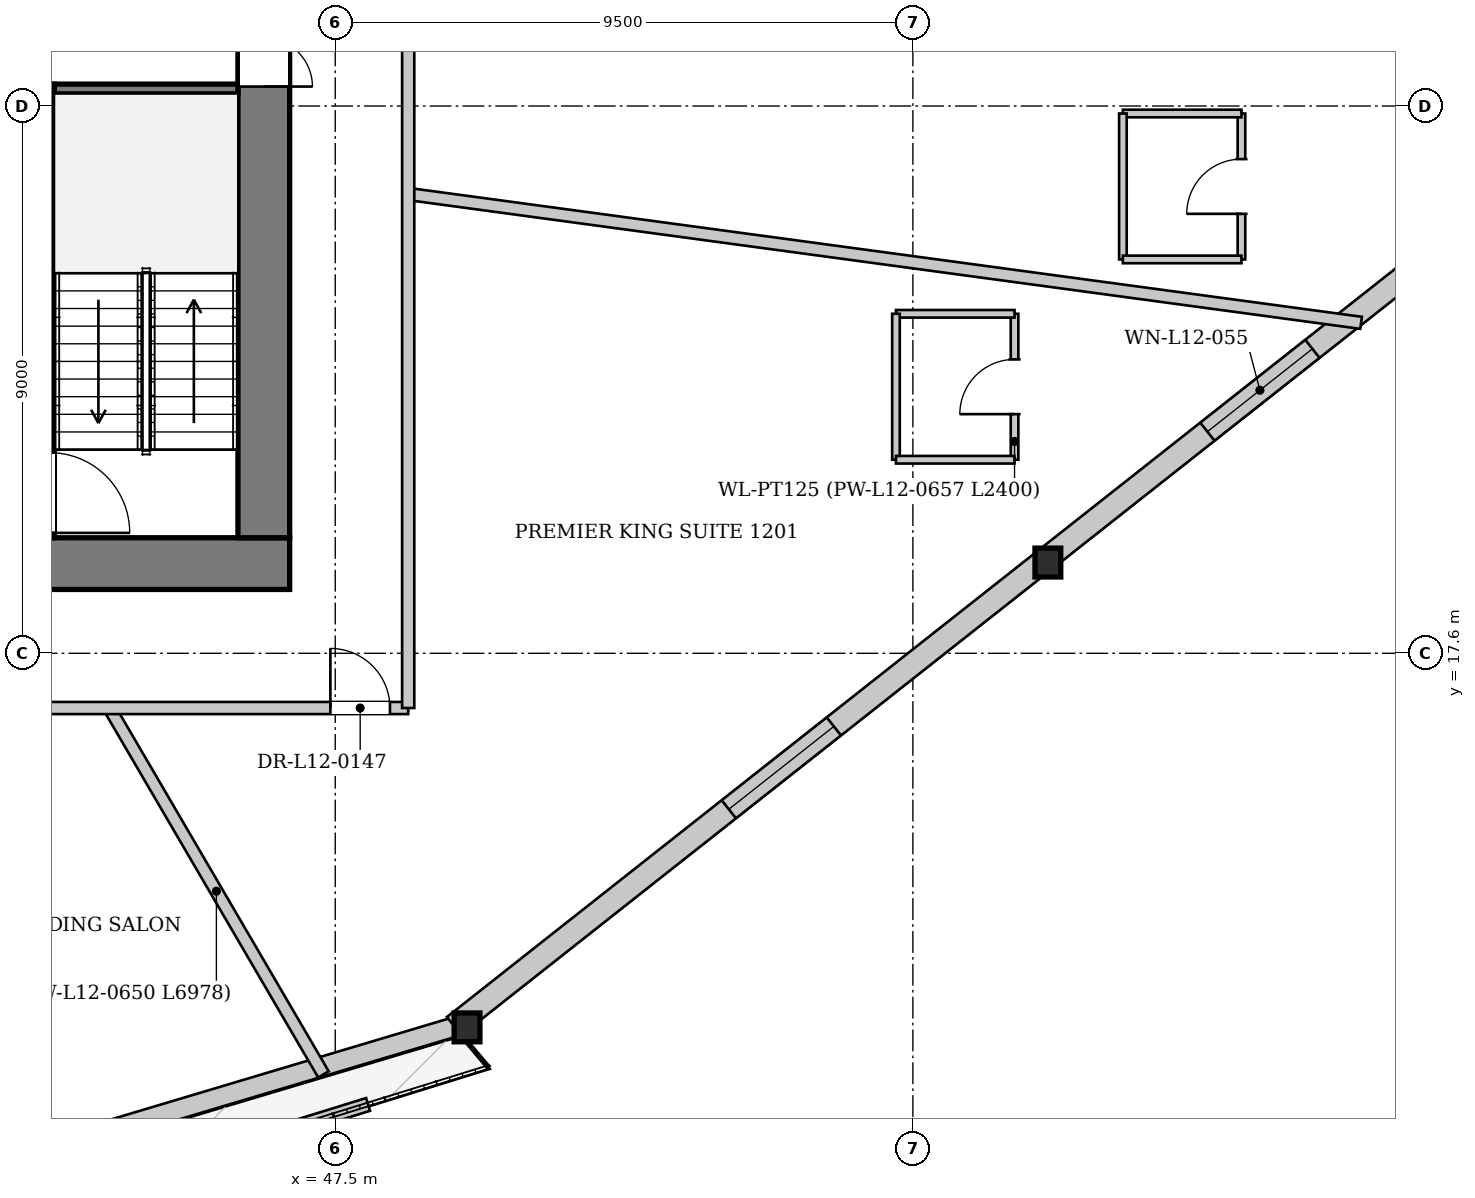
"""IFC4 building model, lengths in metres.
Left out: names, types, materials, properties, quantities, classifications, styles, units other than length and angle.
Written with IfcOpenShell. Run it as: python <this file> out.ifc"""

import sys

from ifc_helpers import new_model, si_unit, direction, frame, frame_2d, origin, origin_2d, place, context, subcontext, project, spatial, rectangle, i_section, extrude, source, transform, mapped, element, fill, save


model = new_model("IFC4")
c1 = context("Model", 3, precision=1e-05, world=origin(), true_north=direction((0.0, 1.0)))
c2 = subcontext(c1, "Body", "Model", "MODEL_VIEW")
j1 = project(units=[si_unit("LENGTHUNIT", "METRE"), si_unit("PLANEANGLEUNIT", "RADIAN")], contexts=[c1])
p1 = place(None, origin())
s1 = spatial("IfcSite", under=j1, at=p1, CompositionType="ELEMENT")
p2 = place(p1, origin())
s2 = spatial("IfcBuilding", under=s1, at=p2, CompositionType="ELEMENT")
p3 = place(p2, frame((0.0, 0.0, 50.6)))
s3 = spatial("IfcBuildingStorey", under=s2, at=p3, CompositionType="ELEMENT", Elevation=50.6)
m1 = source(origin(), c2, "Body", "SweptSolid", [
    extrude(i_section(OverallWidth=0.424, OverallDepth=0.474, WebThickness=0.043, FlangeThickness=0.068, at=origin_2d()), origin(), (0.0, 0.0, 1.0), 3.4),
])
p4 = place(p3, frame((49.572, 11.321, 0.0), z_axis=(0.056153057733, 0.074966486283, 0.995603766587), x_axis=(-0.800367834752, 0.599509240207, 0.0)))
e1 = element("IfcColumn", 1, at=p4, inside=s3, PredefinedType="COLUMN", context=c2, shape_type="MappedRepresentation", body=[
    mapped(m1, transform((0.0, 0.0, 0.0), x_axis=(1.0, 0.0, 0.0), y_axis=(0.0, 1.0, 0.0), z_axis=(0.0, 0.0, 1.0), scale=1.0)),
])
m2 = source(origin(), c2, "Body", "SweptSolid", [
    extrude(i_section(OverallWidth=0.424, OverallDepth=0.474, WebThickness=0.043, FlangeThickness=0.068, at=origin_2d()), origin(), (0.0, 0.0, 1.0), 3.407),
])
p5 = place(p3, frame((59.184, 18.904, 0.0), z_axis=(0.021141159141, 0.110650676994, 0.993634479611), x_axis=(-0.982232614572, 0.187667500841, 0.0)))
e2 = element("IfcColumn", 2, at=p5, inside=s3, PredefinedType="COLUMN", context=c2, shape_type="MappedRepresentation", body=[
    mapped(m2, transform((0.0, 0.0, 0.0), x_axis=(1.0, 0.0, 0.0), y_axis=(0.0, 1.0, 0.0), z_axis=(0.0, 0.0, 1.0), scale=1.0)),
])
p6 = place(p3, frame((49.526, 11.474, 0.0), z_axis=(0.0, 0.0, 1.0), x_axis=(-0.958183644485, -0.286153985541, 0.0)))
e3 = element("IfcWall", 3, at=p6, inside=s3, PredefinedType="SOLIDWALL", context=c2, shape_type="SweptSolid", body=[
    extrude(rectangle(XDim=24.487, YDim=0.32, at=frame_2d((12.244, 0.0))), origin(), (0.0, 0.0, 1.0), 2.592),
])
p7 = place(p6, frame((7.286, 0.0, 0.0)))
e4 = element("IfcOpeningElement", 4, at=p7, cuts=e3, PredefinedType="OPENING", context=c2, shape_type="SweptSolid", body=[
    extrude(rectangle(XDim=1.1, YDim=2.3, at=frame_2d((0.55, 1.15))), frame((0.0, 0.17, 0.0), z_axis=(0.0, -1.0, 0.0), x_axis=(1.0, 0.0, 0.0)), (0.0, 0.0, 1.0), 0.34),
])
p8 = place(p6, frame((17.221, 0.0, 0.272)))
e5 = element("IfcOpeningElement", 5, at=p8, cuts=e3, PredefinedType="OPENING", context=c2, shape_type="SweptSolid", body=[
    extrude(rectangle(XDim=1.8, YDim=2.2, at=frame_2d((0.9, 1.1))), frame((0.0, 0.17, 0.0), z_axis=(0.0, -1.0, 0.0), x_axis=(1.0, 0.0, 0.0)), (0.0, 0.0, 1.0), 0.34),
])
p9 = place(p3, frame((68.679, 26.637, 0.0), z_axis=(0.0, 0.0, 1.0), x_axis=(-0.785087909817, -0.619384350674, 0.0)))
e6 = element("IfcWall", 6, at=p9, inside=s3, PredefinedType="SOLIDWALL", context=c2, shape_type="SweptSolid", body=[
    extrude(rectangle(XDim=24.487, YDim=0.38, at=frame_2d((12.244, 0.0))), origin(), (0.0, 0.0, 1.0), 2.592),
])
p10 = place(p9, frame((6.506, 0.0, 0.222)))
e7 = element("IfcOpeningElement", 7, at=p10, cuts=e6, PredefinedType="OPENING", context=c2, shape_type="SweptSolid", body=[
    extrude(rectangle(XDim=2.2, YDim=2.25, at=frame_2d((1.1, 1.125))), frame((0.0, 0.2, 0.0), z_axis=(0.0, -1.0, 0.0), x_axis=(1.0, 0.0, 0.0)), (0.0, 0.0, 1.0), 0.4),
])
p11 = place(p9, frame((16.531, 0.0, 0.222)))
e8 = element("IfcOpeningElement", 8, at=p11, cuts=e6, PredefinedType="OPENING", context=c2, shape_type="SweptSolid", body=[
    extrude(rectangle(XDim=2.2, YDim=2.25, at=frame_2d((1.1, 1.125))), frame((0.0, 0.2, 0.0), z_axis=(0.0, -1.0, 0.0), x_axis=(1.0, 0.0, 0.0)), (0.0, 0.0, 1.0), 0.4),
])
p12 = place(p3, frame((27.287, 3.753, 0.0), z_axis=(0.0, 0.0, 1.0), x_axis=(0.95522578955, 0.295877831173, 0.0)))
e9 = element("IfcWall", 9, at=p12, inside=s3, PredefinedType="PARAPET", context=c2, shape_type="SweptSolid", body=[
    extrude(rectangle(XDim=21.726, YDim=0.22, at=frame_2d((10.863, 0.0))), origin(), (0.0, 0.0, 1.0), 0.3),
])
p13 = place(p3, frame((46.75, 19.075, 0.0), z_axis=(0.0, 0.0, 1.0), x_axis=(-1.0, 0.0, 0.0)))
e10 = element("IfcWall", 10, at=p13, inside=s3, PredefinedType="SHEAR", context=c2, shape_type="SweptSolid", body=[
    extrude(rectangle(XDim=17.5, YDim=0.85, at=frame_2d((8.75, 0.0))), origin(), (0.0, 0.0, 1.0), 3.3),
])
p14 = place(p13, frame((4.95, 0.0, 0.0)))
e11 = element("IfcOpeningElement", 11, at=p14, cuts=e10, PredefinedType="OPENING", context=c2, shape_type="SweptSolid", body=[
    extrude(rectangle(XDim=1.12, YDim=2.25, at=frame_2d((0.56, 1.125))), frame((0.0, 0.435, 0.0), z_axis=(0.0, -1.0, 0.0), x_axis=(1.0, 0.0, 0.0)), (0.0, 0.0, 1.0), 0.87),
])
p15 = place(p13, frame((11.45, 0.0, 0.0)))
e12 = element("IfcOpeningElement", 12, at=p15, cuts=e10, PredefinedType="OPENING", context=c2, shape_type="SweptSolid", body=[
    extrude(rectangle(XDim=1.12, YDim=2.25, at=frame_2d((0.56, 1.125))), frame((0.0, 0.435, 0.0), z_axis=(0.0, -1.0, 0.0), x_axis=(1.0, 0.0, 0.0)), (0.0, 0.0, 1.0), 0.87),
])
p16 = place(p3, frame((46.325, 33.7, 0.0), z_axis=(0.0, 0.0, 1.0), x_axis=(0.0, -1.0, 0.0)))
e13 = element("IfcWall", 13, at=p16, inside=s3, PredefinedType="SHEAR", context=c2, shape_type="SweptSolid", body=[
    extrude(rectangle(XDim=14.2, YDim=0.85, at=frame_2d((7.1, 0.0))), origin(), (0.0, 0.0, 1.0), 3.3),
])
p17 = place(p16, frame((5.18, 0.0, 0.0)))
e14 = element("IfcOpeningElement", 14, at=p17, cuts=e13, PredefinedType="OPENING", context=c2, shape_type="SweptSolid", body=[
    extrude(rectangle(XDim=1.6, YDim=2.2, at=frame_2d((0.8, 1.1))), frame((0.0, 0.435, 0.0), z_axis=(0.0, -1.0, 0.0), x_axis=(1.0, 0.0, 0.0)), (0.0, 0.0, 1.0), 0.87),
])
p18 = place(p3, frame((42.8, 26.96, 0.0), z_axis=(0.0, 0.0, 1.0), x_axis=(0.0, -1.0, 0.0)))
e15 = element("IfcWall", 15, at=p18, inside=s3, PredefinedType="PARTITIONING", context=c2, shape_type="SweptSolid", body=[
    extrude(rectangle(XDim=7.46, YDim=0.16, at=frame_2d((3.73, 0.0))), origin(), (0.0, 0.0, 1.0), 3.3),
])
p19 = place(p18, frame((6.06, 0.0, 0.0)))
e16 = element("IfcOpeningElement", 16, at=p19, cuts=e15, PredefinedType="OPENING", context=c2, shape_type="SweptSolid", body=[
    extrude(rectangle(XDim=1.32, YDim=2.2, at=frame_2d((0.66, 1.1))), frame((0.0, 0.09, 0.0), z_axis=(0.0, -1.0, 0.0), x_axis=(1.0, 0.0, 0.0)), (0.0, 0.0, 1.0), 0.18),
])
p20 = place(p3, frame((42.88, 26.88, 0.0), z_axis=(0.0, 0.0, 1.0), x_axis=(1.0, 0.0, 0.0)))
e17 = element("IfcWall", 17, at=p20, inside=s3, PredefinedType="PARTITIONING", context=c2, shape_type="SweptSolid", body=[
    extrude(rectangle(XDim=3.02, YDim=0.16, at=frame_2d((1.51, 0.0))), origin(), (0.0, 0.0, 1.0), 3.3),
])
p21 = place(p3, frame((43.785, 16.7, 0.0), z_axis=(0.0, 0.0, 1.0), x_axis=(0.504536520789, -0.863390351573, 0.0)))
e18 = element("IfcWall", 18, at=p21, inside=s3, PredefinedType="PARTITIONING", context=c2, shape_type="SweptSolid", body=[
    extrude(rectangle(XDim=6.978, YDim=0.2, at=frame_2d((3.489, 0.0))), origin(), (0.0, 0.0, 1.0), 3.3),
])
p22 = place(p3, frame((48.7, 25.153, 0.0), z_axis=(0.0, 0.0, 1.0), x_axis=(0.990982571001, -0.133990835404, 0.0)))
e19 = element("IfcWall", 19, at=p22, inside=s3, PredefinedType="PARTITIONING", context=c2, shape_type="SweptSolid", body=[
    extrude(rectangle(XDim=15.814, YDim=0.2, at=frame_2d((7.907, 0.0))), origin(), (0.0, 0.0, 1.0), 3.3),
])
p23 = place(p3, frame((58.672, 20.783, 0.0), z_axis=(0.0, 0.0, 1.0), x_axis=(0.0, 1.0, 0.0)))
e20 = element("IfcWall", 20, at=p23, inside=s3, PredefinedType="PARTITIONING", context=c2, shape_type="SweptSolid", body=[
    extrude(rectangle(XDim=2.4, YDim=0.125, at=frame_2d((1.2, 0.0))), origin(), (0.0, 0.0, 1.0), 3.3),
])
p24 = place(p23, frame((0.75, 0.0, 0.0)))
e21 = element("IfcOpeningElement", 21, at=p24, cuts=e20, PredefinedType="OPENING", context=c2, shape_type="SweptSolid", body=[
    extrude(rectangle(XDim=0.9, YDim=2.1, at=frame_2d((0.45, 1.05))), frame((0.0, 0.073, 0.0), z_axis=(0.0, -1.0, 0.0), x_axis=(1.0, 0.0, 0.0)), (0.0, 0.0, 1.0), 0.145),
])
p25 = place(p3, frame((58.672, 23.183, 0.0), z_axis=(0.0, 0.0, 1.0), x_axis=(-1.0, 0.0, 0.0)))
e22 = element("IfcWall", 22, at=p25, inside=s3, PredefinedType="PARTITIONING", context=c2, shape_type="SweptSolid", body=[
    extrude(rectangle(XDim=1.95, YDim=0.125, at=frame_2d((0.975, 0.0))), origin(), (0.0, 0.0, 1.0), 3.3),
])
p26 = place(p3, frame((56.722, 23.183, 0.0), z_axis=(0.0, 0.0, 1.0), x_axis=(0.0, -1.0, 0.0)))
e23 = element("IfcWall", 23, at=p26, inside=s3, PredefinedType="PARTITIONING", context=c2, shape_type="SweptSolid", body=[
    extrude(rectangle(XDim=2.4, YDim=0.125, at=frame_2d((1.2, 0.0))), origin(), (0.0, 0.0, 1.0), 3.3),
])
p27 = place(p3, frame((56.722, 20.783, 0.0), z_axis=(0.0, 0.0, 1.0), x_axis=(1.0, 0.0, 0.0)))
e24 = element("IfcWall", 24, at=p27, inside=s3, PredefinedType="PARTITIONING", context=c2, shape_type="SweptSolid", body=[
    extrude(rectangle(XDim=1.95, YDim=0.125, at=frame_2d((0.975, 0.0))), origin(), (0.0, 0.0, 1.0), 3.3),
])
p28 = place(p3, frame((62.404, 24.077, 0.0), z_axis=(0.0, 0.0, 1.0), x_axis=(0.0, 1.0, 0.0)))
e25 = element("IfcWall", 25, at=p28, inside=s3, PredefinedType="PARTITIONING", context=c2, shape_type="SweptSolid", body=[
    extrude(rectangle(XDim=2.4, YDim=0.125, at=frame_2d((1.2, 0.0))), origin(), (0.0, 0.0, 1.0), 3.3),
])
p29 = place(p28, frame((0.75, 0.0, 0.0)))
e26 = element("IfcOpeningElement", 26, at=p29, cuts=e25, PredefinedType="OPENING", context=c2, shape_type="SweptSolid", body=[
    extrude(rectangle(XDim=0.9, YDim=2.1, at=frame_2d((0.45, 1.05))), frame((0.0, 0.073, 0.0), z_axis=(0.0, -1.0, 0.0), x_axis=(1.0, 0.0, 0.0)), (0.0, 0.0, 1.0), 0.145),
])
p30 = place(p3, frame((62.404, 26.477, 0.0), z_axis=(0.0, 0.0, 1.0), x_axis=(-1.0, 0.0, 0.0)))
e27 = element("IfcWall", 27, at=p30, inside=s3, PredefinedType="PARTITIONING", context=c2, shape_type="SweptSolid", body=[
    extrude(rectangle(XDim=1.95, YDim=0.125, at=frame_2d((0.975, 0.0))), origin(), (0.0, 0.0, 1.0), 3.3),
])
p31 = place(p3, frame((60.454, 26.477, 0.0), z_axis=(0.0, 0.0, 1.0), x_axis=(0.0, -1.0, 0.0)))
e28 = element("IfcWall", 28, at=p31, inside=s3, PredefinedType="PARTITIONING", context=c2, shape_type="SweptSolid", body=[
    extrude(rectangle(XDim=2.4, YDim=0.125, at=frame_2d((1.2, 0.0))), origin(), (0.0, 0.0, 1.0), 3.3),
])
p32 = place(p3, frame((60.454, 24.077, 0.0), z_axis=(0.0, 0.0, 1.0), x_axis=(1.0, 0.0, 0.0)))
e29 = element("IfcWall", 29, at=p32, inside=s3, PredefinedType="PARTITIONING", context=c2, shape_type="SweptSolid", body=[
    extrude(rectangle(XDim=1.95, YDim=0.125, at=frame_2d((0.975, 0.0))), origin(), (0.0, 0.0, 1.0), 3.3),
])
p33 = place(p3, frame((27.3, 16.7, 0.0), z_axis=(0.0, 0.0, 1.0), x_axis=(1.0, 0.0, 0.0)))
e30 = element("IfcWall", 30, at=p33, inside=s3, PredefinedType="PARTITIONING", context=c2, shape_type="SweptSolid", body=[
    extrude(rectangle(XDim=21.4, YDim=0.2, at=frame_2d((10.7, 0.0))), origin(), (0.0, 0.0, 1.0), 3.3),
])
p34 = place(p33, frame((20.12, 0.0, 0.0)))
e31 = element("IfcOpeningElement", 31, at=p34, cuts=e30, PredefinedType="OPENING", context=c2, shape_type="SweptSolid", body=[
    extrude(rectangle(XDim=0.98, YDim=2.15, at=frame_2d((0.49, 1.075))), frame((0.0, 0.11, 0.0), z_axis=(0.0, -1.0, 0.0), x_axis=(1.0, 0.0, 0.0)), (0.0, 0.0, 1.0), 0.22),
])
p35 = place(p33, frame((0.356, 0.0, 0.0)))
e32 = element("IfcOpeningElement", 32, at=p35, cuts=e30, PredefinedType="OPENING", context=c2, shape_type="SweptSolid", body=[
    extrude(rectangle(XDim=0.98, YDim=2.15, at=frame_2d((0.49, 1.075))), frame((0.0, 0.11, 0.0), z_axis=(0.0, -1.0, 0.0), x_axis=(1.0, 0.0, 0.0)), (0.0, 0.0, 1.0), 0.22),
])
p36 = place(p33, frame((14.236, 0.0, 0.0)))
e33 = element("IfcOpeningElement", 33, at=p36, cuts=e30, PredefinedType="OPENING", context=c2, shape_type="SweptSolid", body=[
    extrude(rectangle(XDim=0.98, YDim=2.15, at=frame_2d((0.49, 1.075))), frame((0.0, 0.11, 0.0), z_axis=(0.0, -1.0, 0.0), x_axis=(1.0, 0.0, 0.0)), (0.0, 0.0, 1.0), 0.22),
])
p37 = place(p3, frame((48.7, 16.7, 0.0), z_axis=(0.0, 0.0, 1.0), x_axis=(0.0, 1.0, 0.0)))
e34 = element("IfcWall", 34, at=p37, inside=s3, PredefinedType="PARTITIONING", context=c2, shape_type="SweptSolid", body=[
    extrude(rectangle(XDim=19.8, YDim=0.2, at=frame_2d((9.9, 0.0))), origin(), (0.0, 0.0, 1.0), 3.3),
])
p38 = place(p37, frame((16.457, 0.0, 0.0)))
e35 = element("IfcOpeningElement", 35, at=p38, cuts=e34, PredefinedType="OPENING", context=c2, shape_type="SweptSolid", body=[
    extrude(rectangle(XDim=0.98, YDim=2.15, at=frame_2d((0.49, 1.075))), frame((0.0, 0.11, 0.0), z_axis=(0.0, -1.0, 0.0), x_axis=(1.0, 0.0, 0.0)), (0.0, 0.0, 1.0), 0.22),
])
m3 = source(origin(), c2, "Body", "SweptSolid", [
    extrude(rectangle(XDim=2.2, YDim=2.25, at=frame_2d((1.1, 1.125))), frame((0.0, 0.03, 0.0), z_axis=(0.0, -1.0, 0.0), x_axis=(1.0, 0.0, 0.0)), (0.0, 0.0, 1.0), 0.06),
])
p39 = place(p10, origin())
e36 = element("IfcWindow", 36, at=p39, inside=s3, PartitioningType="SINGLE_PANEL", PredefinedType="WINDOW", context=c2, shape_type="MappedRepresentation", body=[
    mapped(m3, transform((0.0, 0.0, 0.0), x_axis=(1.0, 0.0, 0.0), y_axis=(0.0, 1.0, 0.0), z_axis=(0.0, 0.0, 1.0), scale=1.0)),
])
fill(e7, e36)
p40 = place(p11, origin())
e37 = element("IfcWindow", 37, at=p40, inside=s3, PartitioningType="SINGLE_PANEL", PredefinedType="WINDOW", context=c2, shape_type="MappedRepresentation", body=[
    mapped(m3, transform((0.0, 0.0, 0.0), x_axis=(1.0, 0.0, 0.0), y_axis=(0.0, 1.0, 0.0), z_axis=(0.0, 0.0, 1.0), scale=1.0)),
])
fill(e8, e37)
m4 = source(origin(), c2, "Body", "SweptSolid", [
    extrude(rectangle(XDim=1.6, YDim=2.2, at=frame_2d((0.8, 1.1))), frame((0.0, 0.025, 0.0), z_axis=(0.0, -1.0, 0.0), x_axis=(1.0, 0.0, 0.0)), (0.0, 0.0, 1.0), 0.05),
])
p41 = place(p17, origin())
e38 = element("IfcDoor", 38, at=p41, inside=s3, OperationType="DOUBLE_DOOR_SINGLE_SWING", PredefinedType="DOOR", context=c2, shape_type="MappedRepresentation", body=[
    mapped(m4, transform((0.0, 0.0, 0.0), x_axis=(1.0, 0.0, 0.0), y_axis=(0.0, 1.0, 0.0), z_axis=(0.0, 0.0, 1.0), scale=1.0)),
])
fill(e14, e38)
m5 = source(origin(), c2, "Body", "SweptSolid", [
    extrude(rectangle(XDim=0.9, YDim=2.1, at=frame_2d((0.45, 1.05))), frame((0.0, 0.025, 0.0), z_axis=(0.0, -1.0, 0.0), x_axis=(1.0, 0.0, 0.0)), (0.0, 0.0, 1.0), 0.05),
])
p42 = place(p24, origin())
e39 = element("IfcDoor", 39, at=p42, inside=s3, OperationType="SINGLE_SWING_LEFT", PredefinedType="DOOR", context=c2, shape_type="MappedRepresentation", body=[
    mapped(m5, transform((0.0, 0.0, 0.0), x_axis=(1.0, 0.0, 0.0), y_axis=(0.0, 1.0, 0.0), z_axis=(0.0, 0.0, 1.0), scale=1.0)),
])
fill(e21, e39)
p43 = place(p29, origin())
e40 = element("IfcDoor", 40, at=p43, inside=s3, OperationType="SINGLE_SWING_LEFT", PredefinedType="DOOR", context=c2, shape_type="MappedRepresentation", body=[
    mapped(m5, transform((0.0, 0.0, 0.0), x_axis=(1.0, 0.0, 0.0), y_axis=(0.0, 1.0, 0.0), z_axis=(0.0, 0.0, 1.0), scale=1.0)),
])
fill(e26, e40)
m6 = source(origin(), c2, "Body", "SweptSolid", [
    extrude(rectangle(XDim=0.98, YDim=2.15, at=frame_2d((0.49, 1.075))), frame((0.0, 0.025, 0.0), z_axis=(0.0, -1.0, 0.0), x_axis=(1.0, 0.0, 0.0)), (0.0, 0.0, 1.0), 0.05),
])
p44 = place(p34, origin())
e41 = element("IfcDoor", 41, at=p44, inside=s3, OperationType="SINGLE_SWING_LEFT", PredefinedType="DOOR", context=c2, shape_type="MappedRepresentation", body=[
    mapped(m6, transform((0.0, 0.0, 0.0), x_axis=(1.0, 0.0, 0.0), y_axis=(0.0, 1.0, 0.0), z_axis=(0.0, 0.0, 1.0), scale=1.0)),
])
fill(e31, e41)
save(model, sys.argv[1])
